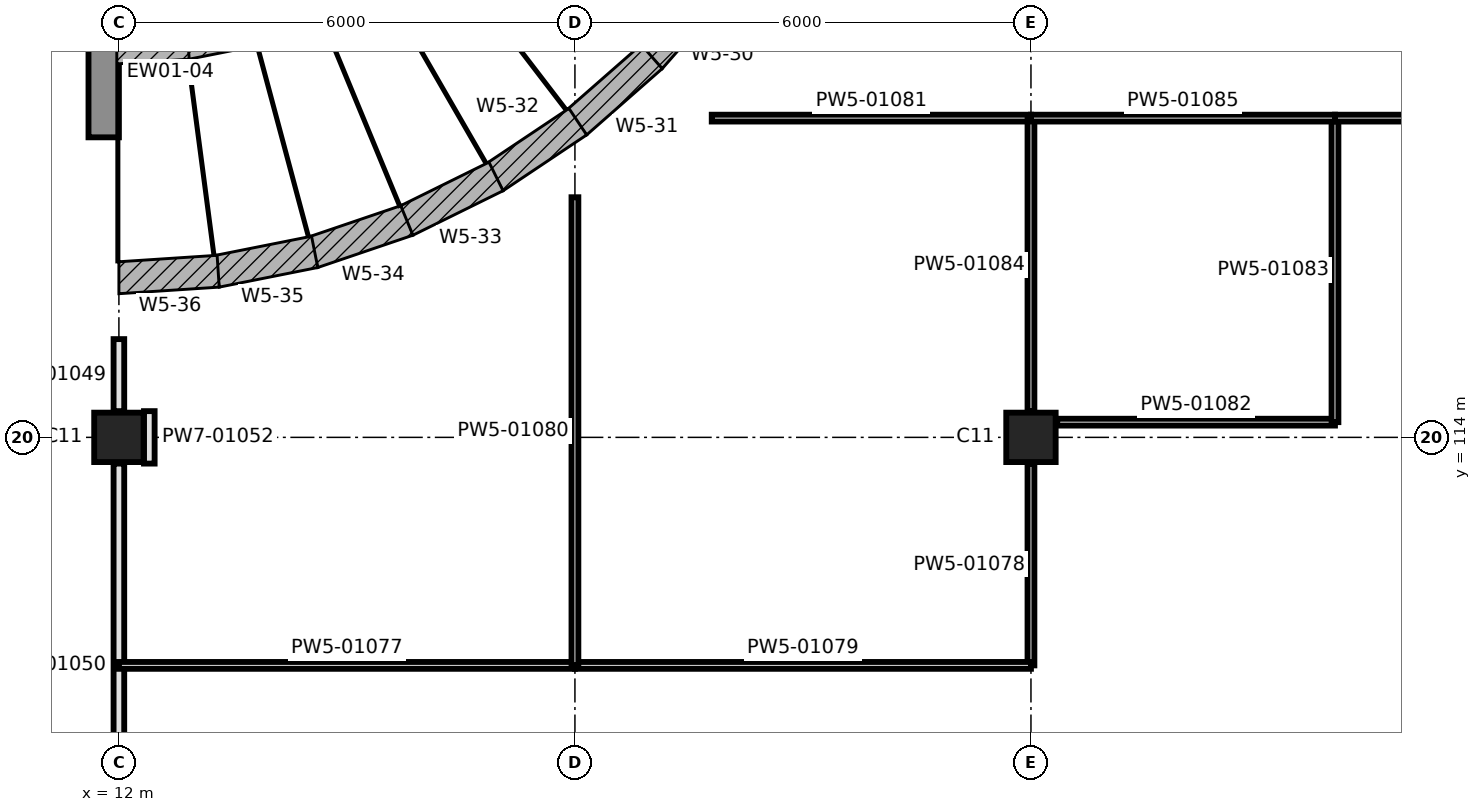
"""IFC4 building model, lengths in metres.
Left out: names, types, materials, properties, quantities, classifications, styles, units other than length and angle.
Written with IfcOpenShell. Run it as: python <this file> out.ifc"""

import sys

from ifc_helpers import new_model, si_unit, direction, frame, frame_2d, origin, origin_2d, place, context, subcontext, project, spatial, polyline, rectangle, outline, extrude, element, fill, save


model = new_model("IFC4")
c1 = context("Model", 3, precision=1e-05, world=origin(), true_north=direction((0.0, 1.0)))
c2 = subcontext(c1, "Body", "Model", "MODEL_VIEW")
j1 = project(units=[si_unit("LENGTHUNIT", "METRE"), si_unit("PLANEANGLEUNIT", "RADIAN")], contexts=[c1])
p1 = place(None, origin())
s1 = spatial("IfcSite", under=j1, at=p1, CompositionType="ELEMENT")
p2 = place(p1, origin())
s2 = spatial("IfcBuilding", under=s1, at=p2, CompositionType="ELEMENT")
p3 = place(p2, frame((0.0, 0.0, 7.0)))
s3 = spatial("IfcBuildingStorey", under=s2, at=p3, CompositionType="ELEMENT", Elevation=7.0)
for number, where, z_axis, x_axis in (
    (1, (12.0, 114.0, 0.0), (0.0, 0.0, 1.0), (1.0, 0.0, 0.0)),
    (2, (24.0, 114.0, 0.0), (0.0, 0.0, 1.0), (1.0, 0.0, 0.0)),
):
    element("IfcColumn", number, at=place(p3, frame(where, z_axis=z_axis, x_axis=x_axis)), inside=s3, PredefinedType="COLUMN", context=c2, shape_type="SweptSolid", body=[
        extrude(rectangle(XDim=0.65, YDim=0.65, at=origin_2d()), origin(), (0.0, 0.0, 1.0), 5.0),
    ])
p4 = place(p3, frame((20.021, 119.845, 0.0), z_axis=(0.630572172367, -0.553093552863, 0.544487150645), x_axis=(-0.659421060078, -0.751773812455, 2.0792921e-05)))
e3 = element("IfcWall", 3, at=p4, inside=s3, PredefinedType="SOLIDWALL", context=c2, shape_type="SweptSolid", body=[
    extrude(outline(polyline([(0.0, 0.0), (1.322, -5.551e-17), (1.125, -5.544), (0.198, -5.544), (0.0, 0.0)])), origin(), (-0.0, 0.544, 0.839), 0.596),
])
p5 = place(p3, frame((19.148, 118.851, 0.0), z_axis=(0.553093552863, -0.630572172367, 0.544487150645), x_axis=(-0.751773812455, -0.659421060078, -2.0792921e-05)))
e4 = element("IfcWall", 4, at=p5, inside=s3, PredefinedType="SOLIDWALL", context=c2, shape_type="SweptSolid", body=[
    extrude(outline(polyline([(0.0, 0.0), (1.322, 5.551e-17), (1.124, -5.544), (0.197, -5.544), (0.0, 0.0)])), origin(), (0.0, 0.544, 0.839), 0.596),
])
p6 = place(p3, frame((18.154, 117.979, 0.0), z_axis=(0.465979494917, -0.697421440223, 0.544487323116), x_axis=(-0.831490422718, -0.555539086285, 2.3173265e-05)))
e5 = element("IfcWall", 5, at=p6, inside=s3, PredefinedType="SOLIDWALL", context=c2, shape_type="SweptSolid", body=[
    extrude(outline(polyline([(0.0, 0.0), (1.322, 0.0), (1.125, -5.544), (0.198, -5.544), (0.0, 0.0)])), origin(), (-3.705e-05, 0.544, 0.839), 0.596),
])
p7 = place(p3, frame((17.055, 117.244, 0.0), z_axis=(0.371027167972, -0.752251892463, 0.544477667964), x_axis=(-0.896847076605, -0.442340729705, 5.472957e-06)))
e6 = element("IfcWall", 6, at=p7, inside=s3, PredefinedType="SOLIDWALL", context=c2, shape_type="SweptSolid", body=[
    extrude(outline(polyline([(0.0, 0.0), (1.322, 0.0), (1.124, -5.544), (0.198, -5.544), (0.0, 0.0)])), origin(), (5.786e-05, 0.544, 0.839), 0.596),
])
p8 = place(p3, frame((15.869, 116.659, 0.0), z_axis=(0.269418488523, -0.794324736016, 0.544483141883), x_axis=(-0.947003545328, -0.321223106822, -2.7908524e-05)))
e7 = element("IfcWall", 7, at=p8, inside=s3, PredefinedType="SOLIDWALL", context=c2, shape_type="SweptSolid", body=[
    extrude(outline(polyline([(0.0, 0.0), (1.322, 5.551e-17), (1.125, -5.544), (0.198, -5.544), (0.0, 0.0)])), origin(), (-0.0, 0.544, 0.839), 0.596),
])
p9 = place(p3, frame((14.616, 116.235, 0.0), z_axis=(0.163726196101, -0.822637628243, 0.544482382919), x_axis=(-0.980766332218, -0.19518555592, 1.8656341e-05)))
e8 = element("IfcWall", 8, at=p9, inside=s3, PredefinedType="SOLIDWALL", context=c2, shape_type="SweptSolid", body=[
    extrude(outline(polyline([(0.0, 0.0), (1.322, 0.0), (1.124, -5.544), (0.198, -5.544), (0.0, 0.0)])), origin(), (9.736e-05, 0.544, 0.839), 0.596),
])
p10 = place(p3, frame((13.32, 115.977, 0.0), z_axis=(0.054899407289, -0.836965590728, 0.544494862249), x_axis=(-0.997853997628, -0.065478224383, -3.9353391e-05)))
e9 = element("IfcWall", 9, at=p10, inside=s3, PredefinedType="SOLIDWALL", context=c2, shape_type="SweptSolid", body=[
    extrude(outline(polyline([(0.0, 0.0), (1.322, 0.0), (1.124, -5.544), (0.197, -5.544), (0.0, 0.0)])), origin(), (7.539e-05, 0.544, 0.839), 0.596),
])
p11 = place(p3, frame((11.8, 119.675, 0.0), z_axis=(0.0, 0.0, 1.0), x_axis=(0.0, -1.0, 0.0)))
e10 = element("IfcWall", 10, at=p11, inside=s3, PredefinedType="SOLIDWALL", context=c2, shape_type="SweptSolid", body=[
    extrude(rectangle(XDim=1.728, YDim=0.4, at=frame_2d((0.864, 0.0))), origin(), (0.0, 0.0, 1.0), 4.05),
])
p12 = place(p3, frame((12.0, 114.345, 0.0), z_axis=(0.0, 0.0, 1.0), x_axis=(0.0, 1.0, 0.0)))
e11 = element("IfcWall", 11, at=p12, inside=s3, PredefinedType="PARTITIONING", context=c2, shape_type="SweptSolid", body=[
    extrude(rectangle(XDim=0.948, YDim=0.14, at=frame_2d((0.474, 0.0))), origin(), (0.0, 0.0, 1.0), 4.05),
])
p13 = place(p3, frame((12.0, 108.345, 0.0), z_axis=(0.0, 0.0, 1.0), x_axis=(0.0, 1.0, 0.0)))
e12 = element("IfcWall", 12, at=p13, inside=s3, PredefinedType="PARTITIONING", context=c2, shape_type="SweptSolid", body=[
    extrude(rectangle(XDim=5.31, YDim=0.14, at=frame_2d((2.655, 0.0))), origin(), (0.0, 0.0, 1.0), 4.05),
])
p14 = place(p13, frame((0.205, 0.0, 0.0)))
e13 = element("IfcOpeningElement", 13, at=p14, cuts=e12, PredefinedType="OPENING", context=c2, shape_type="SweptSolid", body=[
    extrude(rectangle(XDim=1.8, YDim=2.1, at=frame_2d((0.9, 1.05))), frame((0.0, 0.08, 0.0), z_axis=(0.0, -1.0, 0.0), x_axis=(1.0, 0.0, 0.0)), (0.0, 0.0, 1.0), 0.16),
])
p15 = place(p3, frame((12.4, 113.655, 0.0), z_axis=(0.0, 0.0, 1.0), x_axis=(0.0, 1.0, 0.0)))
e14 = element("IfcWall", 14, at=p15, inside=s3, PredefinedType="PARTITIONING", context=c2, shape_type="SweptSolid", body=[
    extrude(rectangle(XDim=0.69, YDim=0.14, at=frame_2d((0.345, 0.0))), origin(), (0.0, 0.0, 1.0), 4.75),
])
p16 = place(p3, frame((12.0, 111.0, 0.0), z_axis=(0.0, 0.0, 1.0), x_axis=(1.0, 0.0, 0.0)))
e15 = element("IfcWall", 15, at=p16, inside=s3, PredefinedType="PARTITIONING", context=c2, shape_type="SweptSolid", body=[
    extrude(rectangle(XDim=6.0, YDim=0.09, at=frame_2d((3.0, 0.0))), origin(), (0.0, 0.0, 1.0), 4.75),
])
p17 = place(p16, frame((2.55, 0.0, 0.0)))
e16 = element("IfcOpeningElement", 16, at=p17, cuts=e15, PredefinedType="OPENING", context=c2, shape_type="SweptSolid", body=[
    extrude(rectangle(XDim=0.92, YDim=2.04, at=frame_2d((0.46, 1.02))), frame((0.0, 0.055, 0.0), z_axis=(0.0, -1.0, 0.0), x_axis=(1.0, 0.0, 0.0)), (0.0, 0.0, 1.0), 0.11),
])
p18 = place(p3, frame((24.0, 111.0, 0.0), z_axis=(0.0, 0.0, 1.0), x_axis=(0.0, 1.0, 0.0)))
e17 = element("IfcWall", 17, at=p18, inside=s3, PredefinedType="PARTITIONING", context=c2, shape_type="SweptSolid", body=[
    extrude(rectangle(XDim=2.655, YDim=0.09, at=frame_2d((1.328, 0.0))), origin(), (0.0, 0.0, 1.0), 4.75),
])
p19 = place(p3, frame((18.0, 111.0, 0.0), z_axis=(0.0, 0.0, 1.0), x_axis=(1.0, 0.0, 0.0)))
e18 = element("IfcWall", 18, at=p19, inside=s3, PredefinedType="PARTITIONING", context=c2, shape_type="SweptSolid", body=[
    extrude(rectangle(XDim=6.0, YDim=0.09, at=frame_2d((3.0, 0.0))), origin(), (0.0, 0.0, 1.0), 4.75),
])
p20 = place(p19, frame((2.55, 0.0, 0.0)))
e19 = element("IfcOpeningElement", 19, at=p20, cuts=e18, PredefinedType="OPENING", context=c2, shape_type="SweptSolid", body=[
    extrude(rectangle(XDim=0.92, YDim=2.04, at=frame_2d((0.46, 1.02))), frame((0.0, 0.055, 0.0), z_axis=(0.0, -1.0, 0.0), x_axis=(1.0, 0.0, 0.0)), (0.0, 0.0, 1.0), 0.11),
])
p21 = place(p3, frame((18.0, 111.0, 0.0), z_axis=(0.0, 0.0, 1.0), x_axis=(0.0, 1.0, 0.0)))
e20 = element("IfcWall", 20, at=p21, inside=s3, PredefinedType="PARTITIONING", context=c2, shape_type="SweptSolid", body=[
    extrude(rectangle(XDim=6.159, YDim=0.09, at=frame_2d((3.08, 0.0))), origin(), (0.0, 0.0, 1.0), 4.75),
])
p22 = place(p3, frame((19.8, 118.2, 0.0), z_axis=(0.0, 0.0, 1.0), x_axis=(1.0, 0.0, 0.0)))
e21 = element("IfcWall", 21, at=p22, inside=s3, PredefinedType="PARTITIONING", context=c2, shape_type="SweptSolid", body=[
    extrude(rectangle(XDim=4.2, YDim=0.09, at=frame_2d((2.1, 0.0))), origin(), (0.0, 0.0, 1.0), 4.75),
])
p23 = place(p3, frame((24.345, 114.2, 0.0), z_axis=(0.0, 0.0, 1.0), x_axis=(1.0, 0.0, 0.0)))
e22 = element("IfcWall", 22, at=p23, inside=s3, PredefinedType="PARTITIONING", context=c2, shape_type="SweptSolid", body=[
    extrude(rectangle(XDim=3.655, YDim=0.09, at=frame_2d((1.828, 0.0))), origin(), (0.0, 0.0, 1.0), 4.75),
])
p24 = place(p23, frame((1.105, 0.0, 0.0)))
e23 = element("IfcOpeningElement", 23, at=p24, cuts=e22, PredefinedType="OPENING", context=c2, shape_type="SweptSolid", body=[
    extrude(rectangle(XDim=1.05, YDim=2.1, at=frame_2d((0.525, 1.05))), frame((0.0, 0.055, 0.0), z_axis=(0.0, -1.0, 0.0), x_axis=(1.0, 0.0, 0.0)), (0.0, 0.0, 1.0), 0.11),
])
p25 = place(p3, frame((28.0, 114.2, 0.0), z_axis=(0.0, 0.0, 1.0), x_axis=(0.0, 1.0, 0.0)))
e24 = element("IfcWall", 24, at=p25, inside=s3, PredefinedType="PARTITIONING", context=c2, shape_type="SweptSolid", body=[
    extrude(rectangle(XDim=4.0, YDim=0.09, at=frame_2d((2.0, 0.0))), origin(), (0.0, 0.0, 1.0), 4.75),
])
p26 = place(p3, frame((24.0, 114.345, 0.0), z_axis=(0.0, 0.0, 1.0), x_axis=(0.0, 1.0, 0.0)))
e25 = element("IfcWall", 25, at=p26, inside=s3, PredefinedType="PARTITIONING", context=c2, shape_type="SweptSolid", body=[
    extrude(rectangle(XDim=3.855, YDim=0.09, at=frame_2d((1.927, 0.0))), origin(), (0.0, 0.0, 1.0), 4.75),
])
p27 = place(p3, frame((24.0, 118.2, 0.0), z_axis=(0.0, 0.0, 1.0), x_axis=(1.0, 0.0, 0.0)))
e26 = element("IfcWall", 26, at=p27, inside=s3, PredefinedType="PARTITIONING", context=c2, shape_type="SweptSolid", body=[
    extrude(rectangle(XDim=4.0, YDim=0.09, at=frame_2d((2.0, 0.0))), origin(), (0.0, 0.0, 1.0), 4.75),
])
p28 = place(p3, frame((28.0, 118.2, 0.0), z_axis=(0.0, 0.0, 1.0), x_axis=(1.0, 0.0, 0.0)))
e27 = element("IfcWall", 27, at=p28, inside=s3, PredefinedType="PARTITIONING", context=c2, shape_type="SweptSolid", body=[
    extrude(rectangle(XDim=14.0, YDim=0.09, at=frame_2d((7.0, 0.0))), origin(), (0.0, 0.0, 1.0), 4.05),
])
p29 = place(p28, frame((6.05, 0.0, 0.0)))
e28 = element("IfcOpeningElement", 28, at=p29, cuts=e27, PredefinedType="OPENING", context=c2, shape_type="SweptSolid", body=[
    extrude(rectangle(XDim=1.8, YDim=2.1, at=frame_2d((0.9, 1.05))), frame((0.0, 0.055, 0.0), z_axis=(0.0, -1.0, 0.0), x_axis=(1.0, 0.0, 0.0)), (0.0, 0.0, 1.0), 0.11),
])
p30 = place(p17, origin())
e29 = element("IfcDoor", 29, at=p30, inside=s3, OperationType="SINGLE_SWING_RIGHT", PredefinedType="DOOR", context=c2, shape_type="SweptSolid", body=[
    extrude(rectangle(XDim=0.92, YDim=2.04, at=frame_2d((0.46, 1.02))), frame((0.0, 0.025, 0.0), z_axis=(0.0, -1.0, 0.0), x_axis=(1.0, 0.0, 0.0)), (0.0, 0.0, 1.0), 0.05),
])
fill(e16, e29)
p31 = place(p20, origin())
e30 = element("IfcDoor", 30, at=p31, inside=s3, OperationType="SINGLE_SWING_RIGHT", PredefinedType="DOOR", context=c2, shape_type="SweptSolid", body=[
    extrude(rectangle(XDim=0.92, YDim=2.04, at=frame_2d((0.46, 1.02))), frame((0.0, 0.025, 0.0), z_axis=(0.0, -1.0, 0.0), x_axis=(1.0, 0.0, 0.0)), (0.0, 0.0, 1.0), 0.05),
])
fill(e19, e30)
p32 = place(p24, origin())
e31 = element("IfcDoor", 31, at=p32, inside=s3, OperationType="SINGLE_SWING_RIGHT", PredefinedType="DOOR", context=c2, shape_type="SweptSolid", body=[
    extrude(rectangle(XDim=1.05, YDim=2.1, at=frame_2d((0.525, 1.05))), frame((0.0, 0.025, 0.0), z_axis=(0.0, -1.0, 0.0), x_axis=(1.0, 0.0, 0.0)), (0.0, 0.0, 1.0), 0.05),
])
fill(e23, e31)
p33 = place(p14, frame((1.8, 0.0, 0.0), z_axis=(0.0, 0.0, 1.0), x_axis=(-1.0, 0.0, 0.0)))
e32 = element("IfcDoor", 32, at=p33, inside=s3, OperationType="DOUBLE_DOOR_SINGLE_SWING", PredefinedType="DOOR", context=c2, shape_type="SweptSolid", body=[
    extrude(rectangle(XDim=1.8, YDim=2.1, at=frame_2d((0.9, 1.05))), frame((0.0, 0.025, 0.0), z_axis=(0.0, -1.0, 0.0), x_axis=(1.0, 0.0, 0.0)), (0.0, 0.0, 1.0), 0.05),
])
fill(e13, e32)
save(model, sys.argv[1])
